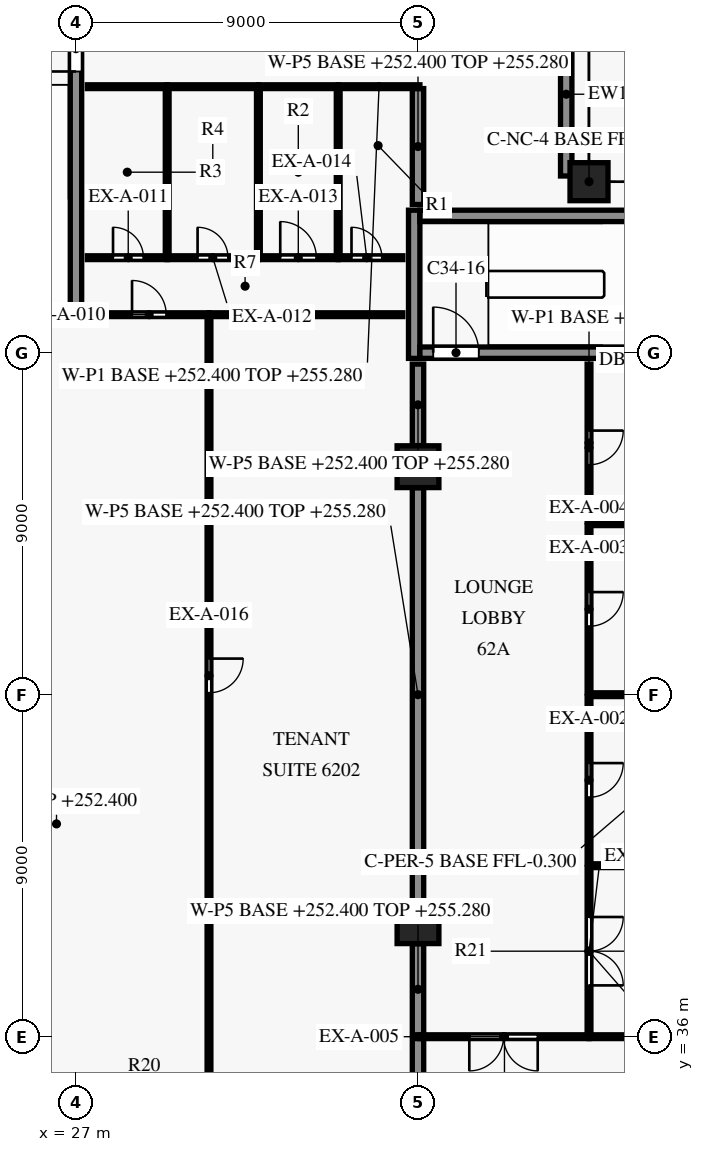
"""IFC4 building model, lengths in metres.
Left out: names, types, materials, properties, quantities, classifications, styles, units other than length and angle.
Written with IfcOpenShell. Run it as: python <this file> out.ifc"""

import sys

from ifc_helpers import new_model, si_unit, direction, frame, frame_2d, origin, origin_2d, place, context, subcontext, project, spatial, rectangle, extrude, element, fill, save


model = new_model("IFC4")
c1 = context("Model", 3, precision=1e-05, world=origin(), true_north=direction((0.0, 1.0)))
c2 = subcontext(c1, "Body", "Model", "MODEL_VIEW")
j1 = project(units=[si_unit("LENGTHUNIT", "METRE"), si_unit("PLANEANGLEUNIT", "RADIAN")], contexts=[c1])
p1 = place(None, origin())
s1 = spatial("IfcSite", under=j1, at=p1, CompositionType="ELEMENT")
p2 = place(p1, origin())
s2 = spatial("IfcBuilding", under=s1, at=p2, CompositionType="ELEMENT")
p3 = place(p2, frame((0.0, 0.0, 252.4)))
s3 = spatial("IfcBuildingStorey", under=s2, at=p3, CompositionType="ELEMENT", Elevation=252.4)
p4 = place(p3, frame((40.5, 58.5, -0.3), z_axis=(0.0, 0.0, 1.0), x_axis=(1.0, 0.0, 0.0)))
e1 = element("IfcColumn", 1, at=p4, inside=s3, PredefinedType="COLUMN", context=c2, shape_type="SweptSolid", body=[
    extrude(rectangle(XDim=1.0, YDim=1.0, at=origin_2d()), origin(), (0.0, 0.0, 1.0), 4.1),
])
for number, where, z_axis, x_axis in (
    (2, (36.0, 39.0, 0.0), (0.0, 0.0, 1.0), (1.0, 0.0, 0.0)),
    (3, (36.0, 51.0, 0.0), (0.0, 0.0, 1.0), (1.0, 0.0, 0.0)),
):
    element("IfcColumn", number, at=place(p3, frame(where, z_axis=z_axis, x_axis=x_axis)), inside=s3, PredefinedType="COLUMN", context=c2, shape_type="SweptSolid", body=[
        extrude(rectangle(XDim=1.1, YDim=1.1, at=origin_2d()), origin(), (0.0, 0.0, 1.0), 3.8),
    ])
p5 = place(p3, frame((39.9, 62.953, 0.0), z_axis=(0.0, 0.0, 1.0), x_axis=(0.0, -1.0, 0.0)))
e4 = element("IfcWall", 4, at=p5, inside=s3, PredefinedType="SOLIDWALL", context=c2, shape_type="SweptSolid", body=[
    extrude(rectangle(XDim=4.303, YDim=0.3, at=frame_2d((2.151, 0.0))), origin(), (0.0, 0.0, 1.0), 3.15),
])
p6 = place(p3, frame((36.05, 54.0, 0.0), z_axis=(0.0, 0.0, 1.0), x_axis=(1.0, 0.0, 0.0)))
e5 = element("IfcWall", 5, at=p6, inside=s3, PredefinedType="SHEAR", context=c2, shape_type="SweptSolid", body=[
    extrude(rectangle(XDim=7.7, YDim=0.3, at=frame_2d((3.85, 0.0))), origin(), (0.0, 0.0, 1.0), 3.5),
])
p7 = place(p6, frame((0.35, 0.0, 0.0)))
e6 = element("IfcOpeningElement", 6, at=p7, cuts=e5, PredefinedType="OPENING", context=c2, shape_type="SweptSolid", body=[
    extrude(rectangle(XDim=1.2, YDim=2.2, at=frame_2d((0.6, 1.1))), frame((0.0, 0.16, 0.0), z_axis=(0.0, -1.0, 0.0), x_axis=(1.0, 0.0, 0.0)), (0.0, 0.0, 1.0), 0.32),
])
p8 = place(p3, frame((23.4, 55.0, 0.0), z_axis=(0.0, 0.0, 1.0), x_axis=(1.0, 0.0, 0.0)))
e7 = element("IfcWall", 7, at=p8, inside=s3, PredefinedType="SHEAR", context=c2, shape_type="SweptSolid", body=[
    extrude(rectangle(XDim=3.45, YDim=0.3, at=frame_2d((1.725, 0.0))), origin(), (0.0, 0.0, 1.0), 3.5),
])
p9 = place(p3, frame((36.05, 57.6, 0.0), z_axis=(0.0, 0.0, 1.0), x_axis=(1.0, 0.0, 0.0)))
e8 = element("IfcWall", 8, at=p9, inside=s3, PredefinedType="SHEAR", context=c2, shape_type="SweptSolid", body=[
    extrude(rectangle(XDim=7.7, YDim=0.3, at=frame_2d((3.85, 0.0))), origin(), (0.0, 0.0, 1.0), 3.5),
])
p10 = place(p3, frame((27.0, 54.85, 0.0), z_axis=(0.0, 0.0, 1.0), x_axis=(0.0, 1.0, 0.0)))
e9 = element("IfcWall", 9, at=p10, inside=s3, PredefinedType="SHEAR", context=c2, shape_type="SweptSolid", body=[
    extrude(rectangle(XDim=8.6, YDim=0.3, at=frame_2d((4.3, 0.0))), origin(), (0.0, 0.0, 1.0), 3.5),
])
p11 = place(p10, frame((6.55, 0.0, 0.0)))
e10 = element("IfcOpeningElement", 10, at=p11, cuts=e9, PredefinedType="OPENING", context=c2, shape_type="SweptSolid", body=[
    extrude(rectangle(XDim=1.2, YDim=2.2, at=frame_2d((0.6, 1.1))), frame((0.0, 0.16, 0.0), z_axis=(0.0, -1.0, 0.0), x_axis=(1.0, 0.0, 0.0)), (0.0, 0.0, 1.0), 0.32),
])
p12 = place(p3, frame((35.9, 53.85, 0.0), z_axis=(0.0, 0.0, 1.0), x_axis=(0.0, 1.0, 0.0)))
e11 = element("IfcWall", 11, at=p12, inside=s3, PredefinedType="SHEAR", context=c2, shape_type="SweptSolid", body=[
    extrude(rectangle(XDim=3.9, YDim=0.3, at=frame_2d((1.95, 0.0))), origin(), (0.0, 0.0, 1.0), 3.5),
])
p13 = place(p3, frame((36.0, 27.774, 0.0), z_axis=(0.0, 0.0, 1.0), x_axis=(0.0, 1.0, 0.0)))
e12 = element("IfcWall", 12, at=p13, inside=s3, PredefinedType="PARTITIONING", context=c2, shape_type="SweptSolid", body=[
    extrude(rectangle(XDim=8.176, YDim=0.3, at=frame_2d((4.088, 0.0))), origin(), (0.0, 0.0, 1.0), 2.88),
])
p14 = place(p3, frame((40.5, 36.0, 0.0), z_axis=(0.0, 0.0, 1.0), x_axis=(-1.0, 0.0, 0.0)))
e13 = element("IfcWall", 13, at=p14, inside=s3, PredefinedType="PARTITIONING", context=c2, shape_type="SweptSolid", body=[
    extrude(rectangle(XDim=4.45, YDim=0.1, at=frame_2d((2.225, 0.0))), origin(), (0.0, 0.0, 1.0), 2.88),
])
p15 = place(p14, frame((1.35, 0.0, 0.0)))
e14 = element("IfcOpeningElement", 14, at=p15, cuts=e13, PredefinedType="OPENING", context=c2, shape_type="SweptSolid", body=[
    extrude(rectangle(XDim=1.8, YDim=2.1, at=frame_2d((0.9, 1.05))), frame((0.0, 0.06, 0.0), z_axis=(0.0, -1.0, 0.0), x_axis=(1.0, 0.0, 0.0)), (0.0, 0.0, 1.0), 0.12),
])
p16 = place(p3, frame((44.53, 36.0, 0.0), z_axis=(0.0, 0.0, 1.0), x_axis=(-1.0, 0.0, 0.0)))
e15 = element("IfcWall", 15, at=p16, inside=s3, PredefinedType="PARTITIONING", context=c2, shape_type="SweptSolid", body=[
    extrude(rectangle(XDim=4.03, YDim=0.1, at=frame_2d((2.015, 0.0))), origin(), (0.0, 0.0, 1.0), 3.48),
])
p17 = place(p3, frame((36.0, 36.05, 0.0), z_axis=(0.0, 0.0, 1.0), x_axis=(0.0, 1.0, 0.0)))
e16 = element("IfcWall", 16, at=p17, inside=s3, PredefinedType="PARTITIONING", context=c2, shape_type="SweptSolid", body=[
    extrude(rectangle(XDim=2.395, YDim=0.3, at=frame_2d((1.198, 0.0))), origin(), (0.0, 0.0, 1.0), 2.88),
])
p18 = place(p3, frame((36.0, 39.555, 0.0), z_axis=(0.0, 0.0, 1.0), x_axis=(0.0, 1.0, 0.0)))
e17 = element("IfcWall", 17, at=p18, inside=s3, PredefinedType="PARTITIONING", context=c2, shape_type="SweptSolid", body=[
    extrude(rectangle(XDim=10.89, YDim=0.3, at=frame_2d((5.445, 0.0))), origin(), (0.0, 0.0, 1.0), 2.88),
])
p19 = place(p3, frame((40.5, 40.45, 0.0), z_axis=(0.0, 0.0, 1.0), x_axis=(0.0, -1.0, 0.0)))
e18 = element("IfcWall", 18, at=p19, inside=s3, PredefinedType="PARTITIONING", context=c2, shape_type="SweptSolid", body=[
    extrude(rectangle(XDim=4.4, YDim=0.1, at=frame_2d((2.2, 0.0))), origin(), (0.0, 0.0, 1.0), 2.88),
])
p20 = place(p19, frame((1.3, 0.0, 0.0)))
e19 = element("IfcOpeningElement", 19, at=p20, cuts=e18, PredefinedType="OPENING", context=c2, shape_type="SweptSolid", body=[
    extrude(rectangle(XDim=1.8, YDim=2.1, at=frame_2d((0.9, 1.05))), frame((0.0, 0.06, 0.0), z_axis=(0.0, -1.0, 0.0), x_axis=(1.0, 0.0, 0.0)), (0.0, 0.0, 1.0), 0.12),
])
p21 = place(p3, frame((40.55, 40.5, 0.0), z_axis=(0.0, 0.0, 1.0), x_axis=(1.0, 0.0, 0.0)))
e20 = element("IfcWall", 20, at=p21, inside=s3, PredefinedType="PARTITIONING", context=c2, shape_type="SweptSolid", body=[
    extrude(rectangle(XDim=3.98, YDim=0.1, at=frame_2d((1.99, 0.0))), origin(), (0.0, 0.0, 1.0), 3.48),
])
p22 = place(p3, frame((40.5, 44.95, 0.0), z_axis=(0.0, 0.0, 1.0), x_axis=(0.0, -1.0, 0.0)))
e21 = element("IfcWall", 21, at=p22, inside=s3, PredefinedType="PARTITIONING", context=c2, shape_type="SweptSolid", body=[
    extrude(rectangle(XDim=4.4, YDim=0.1, at=frame_2d((2.2, 0.0))), origin(), (0.0, 0.0, 1.0), 3.48),
])
p23 = place(p22, frame((1.75, 0.0, 0.0)))
e22 = element("IfcOpeningElement", 22, at=p23, cuts=e21, PredefinedType="OPENING", context=c2, shape_type="SweptSolid", body=[
    extrude(rectangle(XDim=0.9, YDim=2.1, at=frame_2d((0.45, 1.05))), frame((0.0, 0.06, 0.0), z_axis=(0.0, -1.0, 0.0), x_axis=(1.0, 0.0, 0.0)), (0.0, 0.0, 1.0), 0.12),
])
p24 = place(p3, frame((40.55, 45.0, 0.0), z_axis=(0.0, 0.0, 1.0), x_axis=(1.0, 0.0, 0.0)))
e23 = element("IfcWall", 23, at=p24, inside=s3, PredefinedType="PARTITIONING", context=c2, shape_type="SweptSolid", body=[
    extrude(rectangle(XDim=3.98, YDim=0.1, at=frame_2d((1.99, 0.0))), origin(), (0.0, 0.0, 1.0), 3.48),
])
p25 = place(p3, frame((40.5, 49.45, 0.0), z_axis=(0.0, 0.0, 1.0), x_axis=(0.0, -1.0, 0.0)))
e24 = element("IfcWall", 24, at=p25, inside=s3, PredefinedType="PARTITIONING", context=c2, shape_type="SweptSolid", body=[
    extrude(rectangle(XDim=4.4, YDim=0.1, at=frame_2d((2.2, 0.0))), origin(), (0.0, 0.0, 1.0), 3.48),
])
p26 = place(p25, frame((1.75, 0.0, 0.0)))
e25 = element("IfcOpeningElement", 25, at=p26, cuts=e24, PredefinedType="OPENING", context=c2, shape_type="SweptSolid", body=[
    extrude(rectangle(XDim=0.9, YDim=2.1, at=frame_2d((0.45, 1.05))), frame((0.0, 0.06, 0.0), z_axis=(0.0, -1.0, 0.0), x_axis=(1.0, 0.0, 0.0)), (0.0, 0.0, 1.0), 0.12),
])
p27 = place(p3, frame((40.55, 49.5, 0.0), z_axis=(0.0, 0.0, 1.0), x_axis=(1.0, 0.0, 0.0)))
e26 = element("IfcWall", 26, at=p27, inside=s3, PredefinedType="PARTITIONING", context=c2, shape_type="SweptSolid", body=[
    extrude(rectangle(XDim=3.98, YDim=0.1, at=frame_2d((1.99, 0.0))), origin(), (0.0, 0.0, 1.0), 3.48),
])
p28 = place(p3, frame((36.0, 51.555, 0.0), z_axis=(0.0, 0.0, 1.0), x_axis=(0.0, 1.0, 0.0)))
e27 = element("IfcWall", 27, at=p28, inside=s3, PredefinedType="PARTITIONING", context=c2, shape_type="SweptSolid", body=[
    extrude(rectangle(XDim=2.145, YDim=0.3, at=frame_2d((1.073, 0.0))), origin(), (0.0, 0.0, 1.0), 2.88),
])
p29 = place(p3, frame((40.5, 53.7, 0.0), z_axis=(0.0, 0.0, 1.0), x_axis=(0.0, -1.0, 0.0)))
e28 = element("IfcWall", 28, at=p29, inside=s3, PredefinedType="PARTITIONING", context=c2, shape_type="SweptSolid", body=[
    extrude(rectangle(XDim=4.15, YDim=0.1, at=frame_2d((2.075, 0.0))), origin(), (0.0, 0.0, 1.0), 2.88),
])
p30 = place(p29, frame((1.75, 0.0, 0.0)))
e29 = element("IfcOpeningElement", 29, at=p30, cuts=e28, PredefinedType="OPENING", context=c2, shape_type="SweptSolid", body=[
    extrude(rectangle(XDim=0.9, YDim=2.1, at=frame_2d((0.45, 1.05))), frame((0.0, 0.06, 0.0), z_axis=(0.0, -1.0, 0.0), x_axis=(1.0, 0.0, 0.0)), (0.0, 0.0, 1.0), 0.12),
])
p31 = place(p3, frame((30.5, 54.95, 0.0), z_axis=(0.0, 0.0, 1.0), x_axis=(0.0, -1.0, 0.0)))
e30 = element("IfcWall", 30, at=p31, inside=s3, PredefinedType="PARTITIONING", context=c2, shape_type="SweptSolid", body=[
    extrude(rectangle(XDim=21.4, YDim=0.1, at=frame_2d((10.7, 0.0))), origin(), (0.0, 0.0, 1.0), 3.48),
])
p32 = place(p31, frame((9.0, 0.0, 0.0)))
e31 = element("IfcOpeningElement", 31, at=p32, cuts=e30, PredefinedType="OPENING", context=c2, shape_type="SweptSolid", body=[
    extrude(rectangle(XDim=0.9, YDim=2.1, at=frame_2d((0.45, 1.05))), frame((0.0, 0.06, 0.0), z_axis=(0.0, -1.0, 0.0), x_axis=(1.0, 0.0, 0.0)), (0.0, 0.0, 1.0), 0.12),
])
p33 = place(p3, frame((27.3, 55.0, 0.0), z_axis=(0.0, 0.0, 1.0), x_axis=(1.0, 0.0, 0.0)))
e32 = element("IfcWall", 32, at=p33, inside=s3, PredefinedType="PARTITIONING", context=c2, shape_type="SweptSolid", body=[
    extrude(rectangle(XDim=3.2, YDim=0.1, at=frame_2d((1.6, 0.0))), origin(), (0.0, 0.0, 1.0), 3.48),
])
p34 = place(p33, frame((1.175, 0.0, 0.0)))
e33 = element("IfcOpeningElement", 33, at=p34, cuts=e32, PredefinedType="OPENING", context=c2, shape_type="SweptSolid", body=[
    extrude(rectangle(XDim=0.9, YDim=2.1, at=frame_2d((0.45, 1.05))), frame((0.0, 0.06, 0.0), z_axis=(0.0, -1.0, 0.0), x_axis=(1.0, 0.0, 0.0)), (0.0, 0.0, 1.0), 0.12),
])
p35 = place(p3, frame((35.6, 55.0, 0.0), z_axis=(0.0, 0.0, 1.0), x_axis=(-1.0, 0.0, 0.0)))
e34 = element("IfcWall", 34, at=p35, inside=s3, PredefinedType="PARTITIONING", context=c2, shape_type="SweptSolid", body=[
    extrude(rectangle(XDim=5.1, YDim=0.1, at=frame_2d((2.55, 0.0))), origin(), (0.0, 0.0, 1.0), 3.48),
])
p36 = place(p3, frame((27.3, 56.5, 0.0), z_axis=(0.0, 0.0, 1.0), x_axis=(1.0, 0.0, 0.0)))
e35 = element("IfcWall", 35, at=p36, inside=s3, PredefinedType="PARTITIONING", context=c2, shape_type="SweptSolid", body=[
    extrude(rectangle(XDim=2.1, YDim=0.1, at=frame_2d((1.05, 0.0))), origin(), (0.0, 0.0, 1.0), 3.48),
])
p37 = place(p36, frame((0.675, 0.0, 0.0)))
e36 = element("IfcOpeningElement", 36, at=p37, cuts=e35, PredefinedType="OPENING", context=c2, shape_type="SweptSolid", body=[
    extrude(rectangle(XDim=0.8, YDim=2.1, at=frame_2d((0.4, 1.05))), frame((0.0, 0.06, 0.0), z_axis=(0.0, -1.0, 0.0), x_axis=(1.0, 0.0, 0.0)), (0.0, 0.0, 1.0), 0.12),
])
p38 = place(p3, frame((29.4, 56.5, 0.0), z_axis=(0.0, 0.0, 1.0), x_axis=(1.0, 0.0, 0.0)))
e37 = element("IfcWall", 37, at=p38, inside=s3, PredefinedType="PARTITIONING", context=c2, shape_type="SweptSolid", body=[
    extrude(rectangle(XDim=2.4, YDim=0.1, at=frame_2d((1.2, 0.0))), origin(), (0.0, 0.0, 1.0), 3.48),
])
p39 = place(p38, frame((0.8, 0.0, 0.0)))
e38 = element("IfcOpeningElement", 38, at=p39, cuts=e37, PredefinedType="OPENING", context=c2, shape_type="SweptSolid", body=[
    extrude(rectangle(XDim=0.8, YDim=2.1, at=frame_2d((0.4, 1.05))), frame((0.0, 0.06, 0.0), z_axis=(0.0, -1.0, 0.0), x_axis=(1.0, 0.0, 0.0)), (0.0, 0.0, 1.0), 0.12),
])
p40 = place(p3, frame((31.8, 56.5, 0.0), z_axis=(0.0, 0.0, 1.0), x_axis=(1.0, 0.0, 0.0)))
e39 = element("IfcWall", 39, at=p40, inside=s3, PredefinedType="PARTITIONING", context=c2, shape_type="SweptSolid", body=[
    extrude(rectangle(XDim=2.1, YDim=0.1, at=frame_2d((1.05, 0.0))), origin(), (0.0, 0.0, 1.0), 3.48),
])
p41 = place(p40, frame((0.575, 0.0, 0.0)))
e40 = element("IfcOpeningElement", 40, at=p41, cuts=e39, PredefinedType="OPENING", context=c2, shape_type="SweptSolid", body=[
    extrude(rectangle(XDim=0.95, YDim=2.1, at=frame_2d((0.475, 1.05))), frame((0.0, 0.06, 0.0), z_axis=(0.0, -1.0, 0.0), x_axis=(1.0, 0.0, 0.0)), (0.0, 0.0, 1.0), 0.12),
])
p42 = place(p3, frame((33.9, 56.5, 0.0), z_axis=(0.0, 0.0, 1.0), x_axis=(1.0, 0.0, 0.0)))
e41 = element("IfcWall", 41, at=p42, inside=s3, PredefinedType="PARTITIONING", context=c2, shape_type="SweptSolid", body=[
    extrude(rectangle(XDim=1.7, YDim=0.1, at=frame_2d((0.85, 0.0))), origin(), (0.0, 0.0, 1.0), 3.48),
])
p43 = place(p42, frame((0.35, 0.0, 0.0)))
e42 = element("IfcOpeningElement", 42, at=p43, cuts=e41, PredefinedType="OPENING", context=c2, shape_type="SweptSolid", body=[
    extrude(rectangle(XDim=0.8, YDim=2.1, at=frame_2d((0.4, 1.05))), frame((0.0, 0.06, 0.0), z_axis=(0.0, -1.0, 0.0), x_axis=(1.0, 0.0, 0.0)), (0.0, 0.0, 1.0), 0.12),
])
for number, where, z_axis, x_axis in (
    (43, (29.4, 60.95, 0.0), (0.0, 0.0, 1.0), (0.0, -1.0, 0.0)),
    (44, (31.8, 60.95, 0.0), (0.0, 0.0, 1.0), (0.0, -1.0, 0.0)),
    (45, (33.9, 60.95, 0.0), (0.0, 0.0, 1.0), (0.0, -1.0, 0.0)),
):
    element("IfcWall", number, at=place(p3, frame(where, z_axis=z_axis, x_axis=x_axis)), inside=s3, PredefinedType="PARTITIONING", context=c2, shape_type="SweptSolid", body=[
        extrude(rectangle(XDim=4.4, YDim=0.1, at=frame_2d((2.2, 0.0))), origin(), (0.0, 0.0, 1.0), 3.48),
    ])
p44 = place(p3, frame((36.0, 60.95, 0.0), z_axis=(0.0, 0.0, 1.0), x_axis=(0.0, -1.0, 0.0)))
e46 = element("IfcWall", 46, at=p44, inside=s3, PredefinedType="PARTITIONING", context=c2, shape_type="SweptSolid", body=[
    extrude(rectangle(XDim=3.05, YDim=0.3, at=frame_2d((1.525, 0.0))), origin(), (0.0, 0.0, 1.0), 2.88),
])
p45 = place(p3, frame((27.3, 61.0, 0.0), z_axis=(0.0, 0.0, 1.0), x_axis=(1.0, 0.0, 0.0)))
e47 = element("IfcWall", 47, at=p45, inside=s3, PredefinedType="PARTITIONING", context=c2, shape_type="SweptSolid", body=[
    extrude(rectangle(XDim=2.1, YDim=0.1, at=frame_2d((1.05, 0.0))), origin(), (0.0, 0.0, 1.0), 3.48),
])
p46 = place(p3, frame((29.4, 61.0, 0.0), z_axis=(0.0, 0.0, 1.0), x_axis=(1.0, 0.0, 0.0)))
e48 = element("IfcWall", 48, at=p46, inside=s3, PredefinedType="PARTITIONING", context=c2, shape_type="SweptSolid", body=[
    extrude(rectangle(XDim=2.4, YDim=0.1, at=frame_2d((1.2, 0.0))), origin(), (0.0, 0.0, 1.0), 3.48),
])
p47 = place(p3, frame((31.8, 61.0, 0.0), z_axis=(0.0, 0.0, 1.0), x_axis=(1.0, 0.0, 0.0)))
e49 = element("IfcWall", 49, at=p47, inside=s3, PredefinedType="PARTITIONING", context=c2, shape_type="SweptSolid", body=[
    extrude(rectangle(XDim=2.1, YDim=0.1, at=frame_2d((1.05, 0.0))), origin(), (0.0, 0.0, 1.0), 3.48),
])
p48 = place(p3, frame((33.9, 61.0, 0.0), z_axis=(0.0, 0.0, 1.0), x_axis=(1.0, 0.0, 0.0)))
e50 = element("IfcWall", 50, at=p48, inside=s3, PredefinedType="PARTITIONING", context=c2, shape_type="SweptSolid", body=[
    extrude(rectangle(XDim=2.15, YDim=0.1, at=frame_2d((1.075, 0.0))), origin(), (0.0, 0.0, 1.0), 2.88),
])
p49 = place(p11, origin())
e51 = element("IfcDoor", 51, at=p49, inside=s3, OperationType="SINGLE_SWING_LEFT", PredefinedType="DOOR", context=c2, shape_type="SweptSolid", body=[
    extrude(rectangle(XDim=1.2, YDim=2.2, at=frame_2d((0.6, 1.1))), frame((0.0, 0.025, 0.0), z_axis=(0.0, -1.0, 0.0), x_axis=(1.0, 0.0, 0.0)), (0.0, 0.0, 1.0), 0.05),
])
fill(e10, e51)
p50 = place(p7, origin())
e52 = element("IfcDoor", 52, at=p50, inside=s3, OperationType="SINGLE_SWING_LEFT", PredefinedType="DOOR", context=c2, shape_type="SweptSolid", body=[
    extrude(rectangle(XDim=1.2, YDim=2.2, at=frame_2d((0.6, 1.1))), frame((0.0, 0.025, 0.0), z_axis=(0.0, -1.0, 0.0), x_axis=(1.0, 0.0, 0.0)), (0.0, 0.0, 1.0), 0.05),
])
fill(e6, e52)
p51 = place(p20, origin())
e53 = element("IfcDoor", 53, at=p51, inside=s3, OperationType="DOUBLE_DOOR_SINGLE_SWING", PredefinedType="DOOR", context=c2, shape_type="SweptSolid", body=[
    extrude(rectangle(XDim=1.8, YDim=2.1, at=frame_2d((0.9, 1.05))), frame((0.0, 0.025, 0.0), z_axis=(0.0, -1.0, 0.0), x_axis=(1.0, 0.0, 0.0)), (0.0, 0.0, 1.0), 0.05),
])
fill(e19, e53)
p52 = place(p23, origin())
e54 = element("IfcDoor", 54, at=p52, inside=s3, OperationType="SINGLE_SWING_LEFT", PredefinedType="DOOR", context=c2, shape_type="SweptSolid", body=[
    extrude(rectangle(XDim=0.9, YDim=2.1, at=frame_2d((0.45, 1.05))), frame((0.0, 0.025, 0.0), z_axis=(0.0, -1.0, 0.0), x_axis=(1.0, 0.0, 0.0)), (0.0, 0.0, 1.0), 0.05),
])
fill(e22, e54)
p53 = place(p26, origin())
e55 = element("IfcDoor", 55, at=p53, inside=s3, OperationType="SINGLE_SWING_LEFT", PredefinedType="DOOR", context=c2, shape_type="SweptSolid", body=[
    extrude(rectangle(XDim=0.9, YDim=2.1, at=frame_2d((0.45, 1.05))), frame((0.0, 0.025, 0.0), z_axis=(0.0, -1.0, 0.0), x_axis=(1.0, 0.0, 0.0)), (0.0, 0.0, 1.0), 0.05),
])
fill(e25, e55)
p54 = place(p30, origin())
e56 = element("IfcDoor", 56, at=p54, inside=s3, OperationType="SINGLE_SWING_LEFT", PredefinedType="DOOR", context=c2, shape_type="SweptSolid", body=[
    extrude(rectangle(XDim=0.9, YDim=2.1, at=frame_2d((0.45, 1.05))), frame((0.0, 0.025, 0.0), z_axis=(0.0, -1.0, 0.0), x_axis=(1.0, 0.0, 0.0)), (0.0, 0.0, 1.0), 0.05),
])
fill(e29, e56)
p55 = place(p15, origin())
e57 = element("IfcDoor", 57, at=p55, inside=s3, OperationType="DOUBLE_DOOR_SINGLE_SWING", PredefinedType="DOOR", context=c2, shape_type="SweptSolid", body=[
    extrude(rectangle(XDim=1.8, YDim=2.1, at=frame_2d((0.9, 1.05))), frame((0.0, 0.025, 0.0), z_axis=(0.0, -1.0, 0.0), x_axis=(1.0, 0.0, 0.0)), (0.0, 0.0, 1.0), 0.05),
])
fill(e14, e57)
p56 = place(p34, origin())
e58 = element("IfcDoor", 58, at=p56, inside=s3, OperationType="SINGLE_SWING_RIGHT", PredefinedType="DOOR", context=c2, shape_type="SweptSolid", body=[
    extrude(rectangle(XDim=0.9, YDim=2.1, at=frame_2d((0.45, 1.05))), frame((0.0, 0.025, 0.0), z_axis=(0.0, -1.0, 0.0), x_axis=(1.0, 0.0, 0.0)), (0.0, 0.0, 1.0), 0.05),
])
fill(e33, e58)
p57 = place(p37, origin())
e59 = element("IfcDoor", 59, at=p57, inside=s3, OperationType="SINGLE_SWING_LEFT", PredefinedType="DOOR", context=c2, shape_type="SweptSolid", body=[
    extrude(rectangle(XDim=0.8, YDim=2.1, at=frame_2d((0.4, 1.05))), frame((0.0, 0.025, 0.0), z_axis=(0.0, -1.0, 0.0), x_axis=(1.0, 0.0, 0.0)), (0.0, 0.0, 1.0), 0.05),
])
fill(e36, e59)
p58 = place(p39, origin())
e60 = element("IfcDoor", 60, at=p58, inside=s3, OperationType="SINGLE_SWING_RIGHT", PredefinedType="DOOR", context=c2, shape_type="SweptSolid", body=[
    extrude(rectangle(XDim=0.8, YDim=2.1, at=frame_2d((0.4, 1.05))), frame((0.0, 0.025, 0.0), z_axis=(0.0, -1.0, 0.0), x_axis=(1.0, 0.0, 0.0)), (0.0, 0.0, 1.0), 0.05),
])
fill(e38, e60)
p59 = place(p41, origin())
e61 = element("IfcDoor", 61, at=p59, inside=s3, OperationType="SINGLE_SWING_LEFT", PredefinedType="DOOR", context=c2, shape_type="SweptSolid", body=[
    extrude(rectangle(XDim=0.95, YDim=2.1, at=frame_2d((0.475, 1.05))), frame((0.0, 0.025, 0.0), z_axis=(0.0, -1.0, 0.0), x_axis=(1.0, 0.0, 0.0)), (0.0, 0.0, 1.0), 0.05),
])
fill(e40, e61)
p60 = place(p43, origin())
e62 = element("IfcDoor", 62, at=p60, inside=s3, OperationType="SINGLE_SWING_LEFT", PredefinedType="DOOR", context=c2, shape_type="SweptSolid", body=[
    extrude(rectangle(XDim=0.8, YDim=2.1, at=frame_2d((0.4, 1.05))), frame((0.0, 0.025, 0.0), z_axis=(0.0, -1.0, 0.0), x_axis=(1.0, 0.0, 0.0)), (0.0, 0.0, 1.0), 0.05),
])
fill(e42, e62)
p61 = place(p32, origin())
e63 = element("IfcDoor", 63, at=p61, inside=s3, OperationType="SINGLE_SWING_LEFT", PredefinedType="DOOR", context=c2, shape_type="SweptSolid", body=[
    extrude(rectangle(XDim=0.9, YDim=2.1, at=frame_2d((0.45, 1.05))), frame((0.0, 0.025, 0.0), z_axis=(0.0, -1.0, 0.0), x_axis=(1.0, 0.0, 0.0)), (0.0, 0.0, 1.0), 0.05),
])
fill(e31, e63)
save(model, sys.argv[1])
